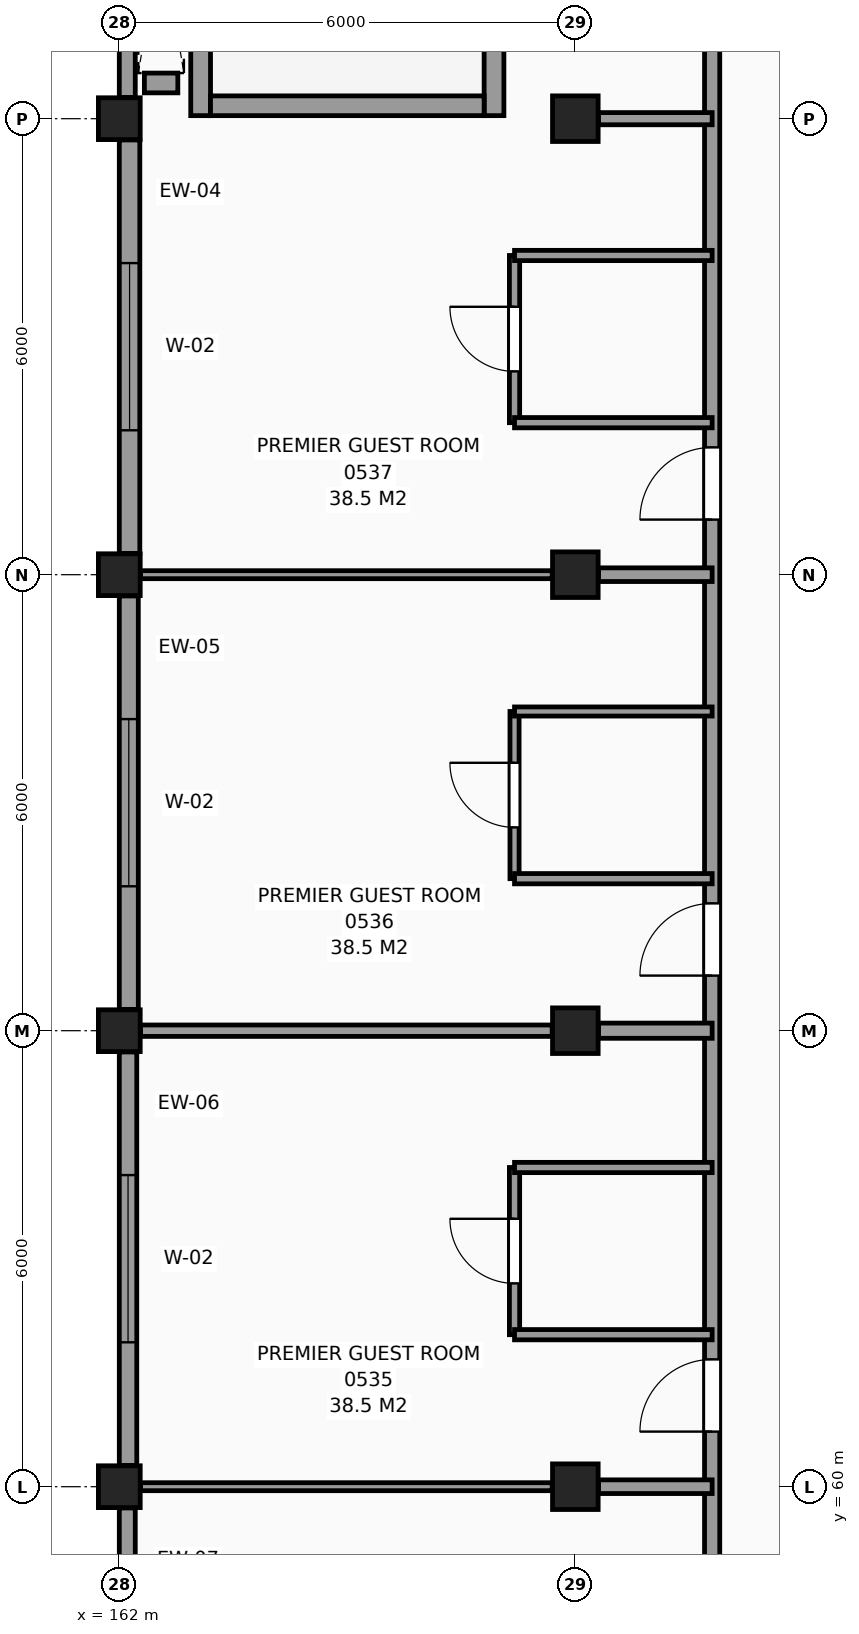
"""IFC4 building model, lengths in metres.
Left out: names, types, materials, properties, quantities, classifications, styles, units other than length and angle.
Written with IfcOpenShell. Run it as: python <this file> out.ifc"""

import sys

from ifc_helpers import new_model, si_unit, direction, frame, frame_2d, origin, origin_2d, place, context, subcontext, project, spatial, rectangle, extrude, element, fill, save


model = new_model("IFC4")
c1 = context("Model", 3, precision=1e-05, world=origin(), true_north=direction((0.0, 1.0)))
c2 = subcontext(c1, "Body", "Model", "MODEL_VIEW")
j1 = project(units=[si_unit("LENGTHUNIT", "METRE"), si_unit("PLANEANGLEUNIT", "RADIAN")], contexts=[c1])
p1 = place(None, origin())
s1 = spatial("IfcSite", under=j1, at=p1, CompositionType="ELEMENT")
p2 = place(p1, origin())
s2 = spatial("IfcBuilding", under=s1, at=p2, CompositionType="ELEMENT")
p3 = place(p2, frame((0.0, 0.0, 24.6)))
s3 = spatial("IfcBuildingStorey", under=s2, at=p3, CompositionType="ELEMENT", Elevation=24.6)
for number, where, z_axis, x_axis in (
    (1, (162.0, 60.0, 0.0), (0.0, 0.0, 1.0), (1.0, 0.0, 0.0)),
    (2, (162.0, 66.0, 0.0), (0.0, 0.0, 1.0), (1.0, 0.0, 0.0)),
    (3, (162.0, 72.0, 0.0), (0.0, 0.0, 1.0), (1.0, 0.0, 0.0)),
    (4, (162.0, 78.0, 0.0), (0.0, 0.0, 1.0), (1.0, 0.0, 0.0)),
):
    element("IfcColumn", number, at=place(p3, frame(where, z_axis=z_axis, x_axis=x_axis)), inside=s3, PredefinedType="COLUMN", context=c2, shape_type="SweptSolid", body=[
        extrude(rectangle(XDim=0.55, YDim=0.55, at=origin_2d()), origin(), (0.0, 0.0, 1.0), 3.6),
    ])
for number, where, z_axis, x_axis in (
    (5, (168.0, 60.0, 0.0), (0.0, 0.0, 1.0), (1.0, 0.0, 0.0)),
    (6, (168.0, 66.0, 0.0), (0.0, 0.0, 1.0), (1.0, 0.0, 0.0)),
    (7, (168.0, 72.0, 0.0), (0.0, 0.0, 1.0), (1.0, 0.0, 0.0)),
    (8, (168.0, 78.0, 0.0), (0.0, 0.0, 1.0), (1.0, 0.0, 0.0)),
):
    element("IfcColumn", number, at=place(p3, frame(where, z_axis=z_axis, x_axis=x_axis)), inside=s3, PredefinedType="COLUMN", context=c2, shape_type="SweptSolid", body=[
        extrude(rectangle(XDim=0.6, YDim=0.6, at=origin_2d()), origin(), (0.0, 0.0, 1.0), 3.6),
    ])
p4 = place(p3, frame((162.105, 83.72, 0.0), z_axis=(0.0, 0.0, 1.0), x_axis=(0.0, -1.0, 0.0)))
e9 = element("IfcWall", 9, at=p4, inside=s3, PredefinedType="SOLIDWALL", context=c2, shape_type="SweptSolid", body=[
    extrude(rectangle(XDim=5.44, YDim=0.21, at=frame_2d((2.72, 0.0))), origin(), (0.0, 0.0, 1.0), 3.38),
])
p5 = place(p3, frame((162.135, 77.72, 0.0), z_axis=(0.0, 0.0, 1.0), x_axis=(0.0, -1.0, 0.0)))
e10 = element("IfcWall", 10, at=p5, inside=s3, PredefinedType="SOLIDWALL", context=c2, shape_type="SweptSolid", body=[
    extrude(rectangle(XDim=5.44, YDim=0.27, at=frame_2d((2.72, 0.0))), origin(), (0.0, 0.0, 1.0), 2.73),
])
p6 = place(p5, frame((1.62, 0.0, 0.8)))
e11 = element("IfcOpeningElement", 11, at=p6, cuts=e10, PredefinedType="OPENING", context=c2, shape_type="SweptSolid", body=[
    extrude(rectangle(XDim=2.2, YDim=1.75, at=frame_2d((1.1, 0.875))), frame((0.0, 0.145, 0.0), z_axis=(0.0, -1.0, 0.0), x_axis=(1.0, 0.0, 0.0)), (0.0, 0.0, 1.0), 0.29),
])
p7 = place(p3, frame((162.125, 71.72, 0.0), z_axis=(0.0, 0.0, 1.0), x_axis=(0.0, -1.0, 0.0)))
e12 = element("IfcWall", 12, at=p7, inside=s3, PredefinedType="SOLIDWALL", context=c2, shape_type="SweptSolid", body=[
    extrude(rectangle(XDim=5.44, YDim=0.25, at=frame_2d((2.72, 0.0))), origin(), (0.0, 0.0, 1.0), 2.73),
])
p8 = place(p7, frame((1.62, 0.0, 0.8)))
e13 = element("IfcOpeningElement", 13, at=p8, cuts=e12, PredefinedType="OPENING", context=c2, shape_type="SweptSolid", body=[
    extrude(rectangle(XDim=2.2, YDim=1.75, at=frame_2d((1.1, 0.875))), frame((0.0, 0.135, 0.0), z_axis=(0.0, -1.0, 0.0), x_axis=(1.0, 0.0, 0.0)), (0.0, 0.0, 1.0), 0.27),
])
p9 = place(p3, frame((162.115, 65.72, 0.0), z_axis=(0.0, 0.0, 1.0), x_axis=(0.0, -1.0, 0.0)))
e14 = element("IfcWall", 14, at=p9, inside=s3, PredefinedType="SOLIDWALL", context=c2, shape_type="SweptSolid", body=[
    extrude(rectangle(XDim=5.44, YDim=0.23, at=frame_2d((2.72, 0.0))), origin(), (0.0, 0.0, 1.0), 2.73),
])
p10 = place(p9, frame((1.62, 0.0, 0.8)))
e15 = element("IfcOpeningElement", 15, at=p10, cuts=e14, PredefinedType="OPENING", context=c2, shape_type="SweptSolid", body=[
    extrude(rectangle(XDim=2.2, YDim=1.75, at=frame_2d((1.1, 0.875))), frame((0.0, 0.125, 0.0), z_axis=(0.0, -1.0, 0.0), x_axis=(1.0, 0.0, 0.0)), (0.0, 0.0, 1.0), 0.25),
])
p11 = place(p3, frame((162.105, 59.72, 0.0), z_axis=(0.0, 0.0, 1.0), x_axis=(0.0, -1.0, 0.0)))
e16 = element("IfcWall", 16, at=p11, inside=s3, PredefinedType="SOLIDWALL", context=c2, shape_type="SweptSolid", body=[
    extrude(rectangle(XDim=5.44, YDim=0.21, at=frame_2d((2.72, 0.0))), origin(), (0.0, 0.0, 1.0), 2.73),
])
p12 = place(p11, frame((1.62, 0.0, 0.8)))
e17 = element("IfcOpeningElement", 17, at=p12, cuts=e16, PredefinedType="OPENING", context=c2, shape_type="SweptSolid", body=[
    extrude(rectangle(XDim=2.2, YDim=1.75, at=frame_2d((1.1, 0.875))), frame((0.0, 0.115, 0.0), z_axis=(0.0, -1.0, 0.0), x_axis=(1.0, 0.0, 0.0)), (0.0, 0.0, 1.0), 0.23),
])
for number, where, z_axis, x_axis in (
    (18, (163.07, 78.04, 0.0), (0.0, 0.0, 1.0), (0.0, 1.0, 0.0)),
    (19, (166.93, 78.04, 0.0), (0.0, 0.0, 1.0), (0.0, 1.0, 0.0)),
):
    element("IfcWall", number, at=place(p3, frame(where, z_axis=z_axis, x_axis=x_axis)), inside=s3, PredefinedType="SHEAR", context=c2, shape_type="SweptSolid", body=[
        extrude(rectangle(XDim=10.72, YDim=0.26, at=frame_2d((5.36, 0.0))), origin(), (0.0, 0.0, 1.0), 3.6),
    ])
p13 = place(p3, frame((163.2, 78.17, 0.0), z_axis=(0.0, 0.0, 1.0), x_axis=(1.0, 0.0, 0.0)))
e20 = element("IfcWall", 20, at=p13, inside=s3, PredefinedType="SHEAR", context=c2, shape_type="SweptSolid", body=[
    extrude(rectangle(XDim=3.6, YDim=0.26, at=frame_2d((1.8, 0.0))), origin(), (0.0, 0.0, 1.0), 3.6),
])
p14 = place(p3, frame((162.33, 78.47, 0.0), z_axis=(0.0, 0.0, 1.0), x_axis=(1.0, 0.0, 0.0)))
e21 = element("IfcWall", 21, at=p14, inside=s3, PredefinedType="SHEAR", context=c2, shape_type="SweptSolid", body=[
    extrude(rectangle(XDim=0.44, YDim=0.26, at=frame_2d((0.22, 0.0))), origin(), (0.0, 0.0, 1.0), 3.6),
])
p15 = place(p3, frame((167.2, 62.0, 0.0), z_axis=(0.0, 0.0, 1.0), x_axis=(0.0, 1.0, 0.0)))
e22 = element("IfcWall", 22, at=p15, inside=s3, PredefinedType="PARTITIONING", context=c2, shape_type="SweptSolid", body=[
    extrude(rectangle(XDim=2.2, YDim=0.135, at=frame_2d((1.1, 0.0))), origin(), (0.0, 0.0, 1.0), 3.38),
])
p16 = place(p15, frame((0.675, 0.0, 0.0)))
e23 = element("IfcOpeningElement", 23, at=p16, cuts=e22, PredefinedType="OPENING", context=c2, shape_type="SweptSolid", body=[
    extrude(rectangle(XDim=0.85, YDim=2.1, at=frame_2d((0.425, 1.05))), frame((0.0, 0.078, 0.0), z_axis=(0.0, -1.0, 0.0), x_axis=(1.0, 0.0, 0.0)), (0.0, 0.0, 1.0), 0.155),
])
p17 = place(p3, frame((167.2, 68.0, 0.0), z_axis=(0.0, 0.0, 1.0), x_axis=(0.0, 1.0, 0.0)))
e24 = element("IfcWall", 24, at=p17, inside=s3, PredefinedType="PARTITIONING", context=c2, shape_type="SweptSolid", body=[
    extrude(rectangle(XDim=2.2, YDim=0.12, at=frame_2d((1.1, 0.0))), origin(), (0.0, 0.0, 1.0), 3.38),
])
p18 = place(p17, frame((0.675, 0.0, 0.0)))
e25 = element("IfcOpeningElement", 25, at=p18, cuts=e24, PredefinedType="OPENING", context=c2, shape_type="SweptSolid", body=[
    extrude(rectangle(XDim=0.85, YDim=2.1, at=frame_2d((0.425, 1.05))), frame((0.0, 0.07, 0.0), z_axis=(0.0, -1.0, 0.0), x_axis=(1.0, 0.0, 0.0)), (0.0, 0.0, 1.0), 0.14),
])
p19 = place(p3, frame((167.2, 74.0, 0.0), z_axis=(0.0, 0.0, 1.0), x_axis=(0.0, 1.0, 0.0)))
e26 = element("IfcWall", 26, at=p19, inside=s3, PredefinedType="PARTITIONING", context=c2, shape_type="SweptSolid", body=[
    extrude(rectangle(XDim=2.2, YDim=0.135, at=frame_2d((1.1, 0.0))), origin(), (0.0, 0.0, 1.0), 3.38),
])
p20 = place(p19, frame((0.675, 0.0, 0.0)))
e27 = element("IfcOpeningElement", 27, at=p20, cuts=e26, PredefinedType="OPENING", context=c2, shape_type="SweptSolid", body=[
    extrude(rectangle(XDim=0.85, YDim=2.1, at=frame_2d((0.425, 1.05))), frame((0.0, 0.078, 0.0), z_axis=(0.0, -1.0, 0.0), x_axis=(1.0, 0.0, 0.0)), (0.0, 0.0, 1.0), 0.155),
])
p21 = place(p3, frame((169.8, 42.215, 0.0), z_axis=(0.0, 0.0, 1.0), x_axis=(0.0, 1.0, 0.0)))
e28 = element("IfcWall", 28, at=p21, inside=s3, PredefinedType="PARTITIONING", context=c2, shape_type="SweptSolid", body=[
    extrude(rectangle(XDim=65.605, YDim=0.2, at=frame_2d((32.802, 0.0))), origin(), (0.0, 0.0, 1.0), 3.38),
])
p22 = place(p21, frame((50.185, 0.0, 0.0)))
e29 = element("IfcOpeningElement", 29, at=p22, cuts=e28, PredefinedType="OPENING", context=c2, shape_type="SweptSolid", body=[
    extrude(rectangle(XDim=1.2, YDim=2.2, at=frame_2d((0.6, 1.1))), frame((0.0, 0.11, 0.0), z_axis=(0.0, -1.0, 0.0), x_axis=(1.0, 0.0, 0.0)), (0.0, 0.0, 1.0), 0.22),
])
p23 = place(p21, frame((0.46, 0.0, 0.0)))
e30 = element("IfcOpeningElement", 30, at=p23, cuts=e28, PredefinedType="OPENING", context=c2, shape_type="SweptSolid", body=[
    extrude(rectangle(XDim=0.95, YDim=2.1, at=frame_2d((0.475, 1.05))), frame((0.0, 0.11, 0.0), z_axis=(0.0, -1.0, 0.0), x_axis=(1.0, 0.0, 0.0)), (0.0, 0.0, 1.0), 0.22),
])
p24 = place(p21, frame((6.51, 0.0, 0.0)))
e31 = element("IfcOpeningElement", 31, at=p24, cuts=e28, PredefinedType="OPENING", context=c2, shape_type="SweptSolid", body=[
    extrude(rectangle(XDim=0.95, YDim=2.1, at=frame_2d((0.475, 1.05))), frame((0.0, 0.11, 0.0), z_axis=(0.0, -1.0, 0.0), x_axis=(1.0, 0.0, 0.0)), (0.0, 0.0, 1.0), 0.22),
])
p25 = place(p21, frame((12.51, 0.0, 0.0)))
e32 = element("IfcOpeningElement", 32, at=p25, cuts=e28, PredefinedType="OPENING", context=c2, shape_type="SweptSolid", body=[
    extrude(rectangle(XDim=0.95, YDim=2.1, at=frame_2d((0.475, 1.05))), frame((0.0, 0.11, 0.0), z_axis=(0.0, -1.0, 0.0), x_axis=(1.0, 0.0, 0.0)), (0.0, 0.0, 1.0), 0.22),
])
p26 = place(p21, frame((18.51, 0.0, 0.0)))
e33 = element("IfcOpeningElement", 33, at=p26, cuts=e28, PredefinedType="OPENING", context=c2, shape_type="SweptSolid", body=[
    extrude(rectangle(XDim=0.95, YDim=2.1, at=frame_2d((0.475, 1.05))), frame((0.0, 0.11, 0.0), z_axis=(0.0, -1.0, 0.0), x_axis=(1.0, 0.0, 0.0)), (0.0, 0.0, 1.0), 0.22),
])
p27 = place(p21, frame((24.51, 0.0, 0.0)))
e34 = element("IfcOpeningElement", 34, at=p27, cuts=e28, PredefinedType="OPENING", context=c2, shape_type="SweptSolid", body=[
    extrude(rectangle(XDim=0.95, YDim=2.1, at=frame_2d((0.475, 1.05))), frame((0.0, 0.11, 0.0), z_axis=(0.0, -1.0, 0.0), x_axis=(1.0, 0.0, 0.0)), (0.0, 0.0, 1.0), 0.22),
])
p28 = place(p21, frame((30.51, 0.0, 0.0)))
e35 = element("IfcOpeningElement", 35, at=p28, cuts=e28, PredefinedType="OPENING", context=c2, shape_type="SweptSolid", body=[
    extrude(rectangle(XDim=0.95, YDim=2.1, at=frame_2d((0.475, 1.05))), frame((0.0, 0.11, 0.0), z_axis=(0.0, -1.0, 0.0), x_axis=(1.0, 0.0, 0.0)), (0.0, 0.0, 1.0), 0.22),
])
p29 = place(p21, frame((54.51, 0.0, 0.0)))
e36 = element("IfcOpeningElement", 36, at=p29, cuts=e28, PredefinedType="OPENING", context=c2, shape_type="SweptSolid", body=[
    extrude(rectangle(XDim=0.95, YDim=2.1, at=frame_2d((0.475, 1.05))), frame((0.0, 0.11, 0.0), z_axis=(0.0, -1.0, 0.0), x_axis=(1.0, 0.0, 0.0)), (0.0, 0.0, 1.0), 0.22),
])
p30 = place(p21, frame((60.51, 0.0, 0.0)))
e37 = element("IfcOpeningElement", 37, at=p30, cuts=e28, PredefinedType="OPENING", context=c2, shape_type="SweptSolid", body=[
    extrude(rectangle(XDim=0.95, YDim=2.1, at=frame_2d((0.475, 1.05))), frame((0.0, 0.11, 0.0), z_axis=(0.0, -1.0, 0.0), x_axis=(1.0, 0.0, 0.0)), (0.0, 0.0, 1.0), 0.22),
])
p31 = place(p3, frame((162.28, 60.0, 0.0), z_axis=(0.0, 0.0, 1.0), x_axis=(1.0, 0.0, 0.0)))
e38 = element("IfcWall", 38, at=p31, inside=s3, PredefinedType="PARTITIONING", context=c2, shape_type="SweptSolid", body=[
    extrude(rectangle(XDim=5.415, YDim=0.105, at=frame_2d((2.708, 0.0))), origin(), (0.0, 0.0, 1.0), 2.58),
])
p32 = place(p3, frame((168.305, 60.0, 0.0), z_axis=(0.0, 0.0, 1.0), x_axis=(1.0, 0.0, 0.0)))
e39 = element("IfcWall", 39, at=p32, inside=s3, PredefinedType="PARTITIONING", context=c2, shape_type="SweptSolid", body=[
    extrude(rectangle(XDim=1.495, YDim=0.18, at=frame_2d((0.748, 0.0))), origin(), (0.0, 0.0, 1.0), 2.58),
])
for number, where, z_axis, x_axis in (
    (40, (167.2, 62.0, 0.0), (0.0, 0.0, 1.0), (1.0, 0.0, 0.0)),
    (41, (167.2, 64.2, 0.0), (0.0, 0.0, 1.0), (1.0, 0.0, 0.0)),
):
    element("IfcWall", number, at=place(p3, frame(where, z_axis=z_axis, x_axis=x_axis)), inside=s3, PredefinedType="PARTITIONING", context=c2, shape_type="SweptSolid", body=[
        extrude(rectangle(XDim=2.6, YDim=0.135, at=frame_2d((1.3, 0.0))), origin(), (0.0, 0.0, 1.0), 3.38),
    ])
p33 = place(p3, frame((162.28, 66.0, 0.0), z_axis=(0.0, 0.0, 1.0), x_axis=(1.0, 0.0, 0.0)))
e42 = element("IfcWall", 42, at=p33, inside=s3, PredefinedType="PARTITIONING", context=c2, shape_type="SweptSolid", body=[
    extrude(rectangle(XDim=5.415, YDim=0.15, at=frame_2d((2.708, 0.0))), origin(), (0.0, 0.0, 1.0), 2.58),
])
p34 = place(p3, frame((168.305, 66.0, 0.0), z_axis=(0.0, 0.0, 1.0), x_axis=(1.0, 0.0, 0.0)))
e43 = element("IfcWall", 43, at=p34, inside=s3, PredefinedType="PARTITIONING", context=c2, shape_type="SweptSolid", body=[
    extrude(rectangle(XDim=1.495, YDim=0.2, at=frame_2d((0.748, 0.0))), origin(), (0.0, 0.0, 1.0), 2.58),
])
p35 = place(p3, frame((167.2, 68.0, 0.0), z_axis=(0.0, 0.0, 1.0), x_axis=(1.0, 0.0, 0.0)))
e44 = element("IfcWall", 44, at=p35, inside=s3, PredefinedType="PARTITIONING", context=c2, shape_type="SweptSolid", body=[
    extrude(rectangle(XDim=2.6, YDim=0.135, at=frame_2d((1.3, 0.0))), origin(), (0.0, 0.0, 1.0), 3.38),
])
p36 = place(p3, frame((167.2, 70.2, 0.0), z_axis=(0.0, 0.0, 1.0), x_axis=(1.0, 0.0, 0.0)))
e45 = element("IfcWall", 45, at=p36, inside=s3, PredefinedType="PARTITIONING", context=c2, shape_type="SweptSolid", body=[
    extrude(rectangle(XDim=2.6, YDim=0.12, at=frame_2d((1.3, 0.0))), origin(), (0.0, 0.0, 1.0), 3.38),
])
p37 = place(p3, frame((162.28, 72.0, 0.0), z_axis=(0.0, 0.0, 1.0), x_axis=(1.0, 0.0, 0.0)))
e46 = element("IfcWall", 46, at=p37, inside=s3, PredefinedType="PARTITIONING", context=c2, shape_type="SweptSolid", body=[
    extrude(rectangle(XDim=5.415, YDim=0.105, at=frame_2d((2.708, 0.0))), origin(), (0.0, 0.0, 1.0), 2.58),
])
p38 = place(p3, frame((168.305, 72.0, 0.0), z_axis=(0.0, 0.0, 1.0), x_axis=(1.0, 0.0, 0.0)))
e47 = element("IfcWall", 47, at=p38, inside=s3, PredefinedType="PARTITIONING", context=c2, shape_type="SweptSolid", body=[
    extrude(rectangle(XDim=1.495, YDim=0.18, at=frame_2d((0.748, 0.0))), origin(), (0.0, 0.0, 1.0), 2.58),
])
for number, where, z_axis, x_axis in (
    (48, (167.2, 74.0, 0.0), (0.0, 0.0, 1.0), (1.0, 0.0, 0.0)),
    (49, (167.2, 76.2, 0.0), (0.0, 0.0, 1.0), (1.0, 0.0, 0.0)),
):
    element("IfcWall", number, at=place(p3, frame(where, z_axis=z_axis, x_axis=x_axis)), inside=s3, PredefinedType="PARTITIONING", context=c2, shape_type="SweptSolid", body=[
        extrude(rectangle(XDim=2.6, YDim=0.135, at=frame_2d((1.3, 0.0))), origin(), (0.0, 0.0, 1.0), 3.38),
    ])
p39 = place(p3, frame((168.305, 78.0, 0.0), z_axis=(0.0, 0.0, 1.0), x_axis=(1.0, 0.0, 0.0)))
e50 = element("IfcWall", 50, at=p39, inside=s3, PredefinedType="PARTITIONING", context=c2, shape_type="SweptSolid", body=[
    extrude(rectangle(XDim=1.495, YDim=0.16, at=frame_2d((0.748, 0.0))), origin(), (0.0, 0.0, 1.0), 2.58),
])
p40 = place(p10, origin())
e51 = element("IfcWindow", 51, at=p40, inside=s3, PartitioningType="SINGLE_PANEL", PredefinedType="WINDOW", context=c2, shape_type="SweptSolid", body=[
    extrude(rectangle(XDim=2.2, YDim=1.75, at=frame_2d((1.1, 0.875))), frame((0.0, 0.03, 0.0), z_axis=(0.0, -1.0, 0.0), x_axis=(1.0, 0.0, 0.0)), (0.0, 0.0, 1.0), 0.06),
])
fill(e15, e51)
p41 = place(p8, origin())
e52 = element("IfcWindow", 52, at=p41, inside=s3, PartitioningType="SINGLE_PANEL", PredefinedType="WINDOW", context=c2, shape_type="SweptSolid", body=[
    extrude(rectangle(XDim=2.2, YDim=1.75, at=frame_2d((1.1, 0.875))), frame((0.0, 0.03, 0.0), z_axis=(0.0, -1.0, 0.0), x_axis=(1.0, 0.0, 0.0)), (0.0, 0.0, 1.0), 0.06),
])
fill(e13, e52)
p42 = place(p6, origin())
e53 = element("IfcWindow", 53, at=p42, inside=s3, PartitioningType="SINGLE_PANEL", PredefinedType="WINDOW", context=c2, shape_type="SweptSolid", body=[
    extrude(rectangle(XDim=2.2, YDim=1.75, at=frame_2d((1.1, 0.875))), frame((0.0, 0.03, 0.0), z_axis=(0.0, -1.0, 0.0), x_axis=(1.0, 0.0, 0.0)), (0.0, 0.0, 1.0), 0.06),
])
fill(e11, e53)
p43 = place(p16, origin())
e54 = element("IfcDoor", 54, at=p43, inside=s3, OperationType="SINGLE_SWING_RIGHT", PredefinedType="DOOR", context=c2, shape_type="SweptSolid", body=[
    extrude(rectangle(XDim=0.85, YDim=2.1, at=frame_2d((0.425, 1.05))), frame((0.0, 0.025, 0.0), z_axis=(0.0, -1.0, 0.0), x_axis=(1.0, 0.0, 0.0)), (0.0, 0.0, 1.0), 0.05),
])
fill(e23, e54)
p44 = place(p26, origin())
e55 = element("IfcDoor", 55, at=p44, inside=s3, OperationType="SINGLE_SWING_LEFT", PredefinedType="DOOR", context=c2, shape_type="SweptSolid", body=[
    extrude(rectangle(XDim=0.95, YDim=2.1, at=frame_2d((0.475, 1.05))), frame((0.0, 0.025, 0.0), z_axis=(0.0, -1.0, 0.0), x_axis=(1.0, 0.0, 0.0)), (0.0, 0.0, 1.0), 0.05),
])
fill(e33, e55)
p45 = place(p18, origin())
e56 = element("IfcDoor", 56, at=p45, inside=s3, OperationType="SINGLE_SWING_RIGHT", PredefinedType="DOOR", context=c2, shape_type="SweptSolid", body=[
    extrude(rectangle(XDim=0.85, YDim=2.1, at=frame_2d((0.425, 1.05))), frame((0.0, 0.025, 0.0), z_axis=(0.0, -1.0, 0.0), x_axis=(1.0, 0.0, 0.0)), (0.0, 0.0, 1.0), 0.05),
])
fill(e25, e56)
p46 = place(p27, origin())
e57 = element("IfcDoor", 57, at=p46, inside=s3, OperationType="SINGLE_SWING_LEFT", PredefinedType="DOOR", context=c2, shape_type="SweptSolid", body=[
    extrude(rectangle(XDim=0.95, YDim=2.1, at=frame_2d((0.475, 1.05))), frame((0.0, 0.025, 0.0), z_axis=(0.0, -1.0, 0.0), x_axis=(1.0, 0.0, 0.0)), (0.0, 0.0, 1.0), 0.05),
])
fill(e34, e57)
p47 = place(p20, origin())
e58 = element("IfcDoor", 58, at=p47, inside=s3, OperationType="SINGLE_SWING_RIGHT", PredefinedType="DOOR", context=c2, shape_type="SweptSolid", body=[
    extrude(rectangle(XDim=0.85, YDim=2.1, at=frame_2d((0.425, 1.05))), frame((0.0, 0.025, 0.0), z_axis=(0.0, -1.0, 0.0), x_axis=(1.0, 0.0, 0.0)), (0.0, 0.0, 1.0), 0.05),
])
fill(e27, e58)
p48 = place(p28, origin())
e59 = element("IfcDoor", 59, at=p48, inside=s3, OperationType="SINGLE_SWING_LEFT", PredefinedType="DOOR", context=c2, shape_type="SweptSolid", body=[
    extrude(rectangle(XDim=0.95, YDim=2.1, at=frame_2d((0.475, 1.05))), frame((0.0, 0.025, 0.0), z_axis=(0.0, -1.0, 0.0), x_axis=(1.0, 0.0, 0.0)), (0.0, 0.0, 1.0), 0.05),
])
fill(e35, e59)
save(model, sys.argv[1])
